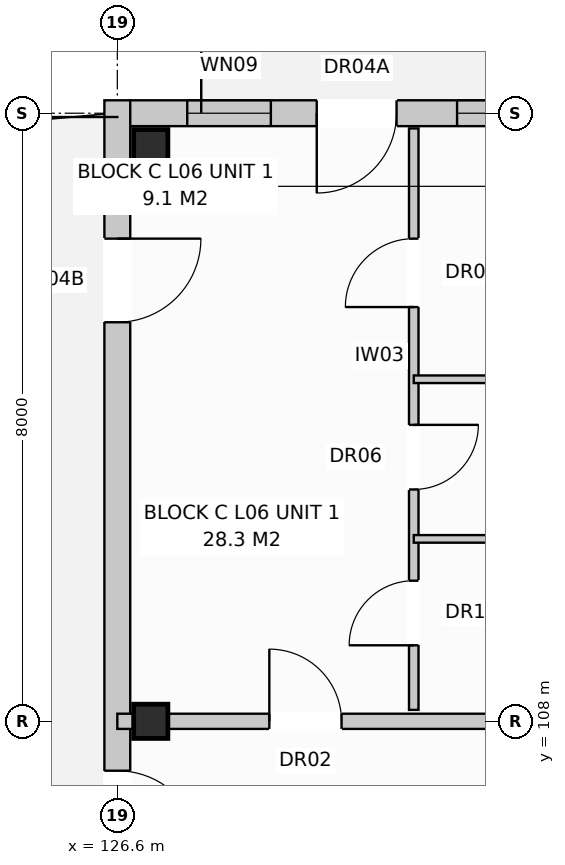
"""IFC4 building model, lengths in metres.
Left out: names, types, materials, properties, quantities, classifications, styles, units other than length and angle.
Written with IfcOpenShell. Run it as: python <this file> out.ifc"""

import sys

from ifc_helpers import new_model, si_unit, direction, frame, frame_2d, origin, origin_with_axes, origin_2d, place, context, subcontext, project, spatial, rectangle, extrude, element, fill, save


model = new_model("IFC4")
c1 = context("Model", 3, precision=1e-05, world=origin(), true_north=direction((0.0, 1.0)))
c2 = subcontext(c1, "Body", "Model", "MODEL_VIEW")
j1 = project(units=[si_unit("LENGTHUNIT", "METRE"), si_unit("PLANEANGLEUNIT", "RADIAN")], contexts=[c1])
p1 = place(None, origin())
s1 = spatial("IfcSite", under=j1, at=p1, CompositionType="ELEMENT")
p2 = place(p1, origin())
s2 = spatial("IfcBuilding", under=s1, at=p2, CompositionType="ELEMENT")
p3 = place(p2, frame((0.0, 0.0, 20.8)))
s3 = spatial("IfcBuildingStorey", under=s2, at=p3, CompositionType="ELEMENT", Elevation=20.8)
for number, where, z_axis, x_axis in (
    (1, (127.04, 108.0, 0.0), (0.0, 0.0, 1.0), (1.0, 0.0, 0.0)),
    (2, (127.04, 115.56, 0.0), (0.0, 0.0, 1.0), (1.0, 0.0, 0.0)),
):
    element("IfcColumn", number, at=place(p3, frame(where, z_axis=z_axis, x_axis=x_axis)), inside=s3, PredefinedType="COLUMN", context=c2, shape_type="SweptSolid", body=[
        extrude(rectangle(XDim=0.45, YDim=0.45, at=origin_2d()), origin(), (0.0, 0.0, 1.0), 3.2),
    ])
p4 = place(p3, frame((126.76, 116.0, 0.0), z_axis=(0.0, 0.0, 1.0), x_axis=(1.0, 0.0, 0.0)))
e3 = element("IfcWall", 3, at=p4, inside=s3, PredefinedType="STANDARD", context=c2, shape_type="SweptSolid", body=[
    extrude(rectangle(XDim=41.08, YDim=0.34, at=frame_2d((20.54, 0.0))), origin(), (0.0, 0.0, 1.0), 2.95),
])
p5 = place(p4, frame((2.464, 0.0, 0.0)))
e4 = element("IfcOpeningElement", 4, at=p5, cuts=e3, PredefinedType="OPENING", context=c2, shape_type="SweptSolid", body=[
    extrude(rectangle(XDim=1.05, YDim=2.12, at=frame_2d((0.525, 1.06))), frame((0.0, 0.182, 0.0), z_axis=(0.0, -1.0, 0.0), x_axis=(1.0, 0.0, 0.0)), (0.0, 0.0, 1.0), 0.364),
])
p6 = place(p4, frame((18.86, 0.0, 0.0)))
e5 = element("IfcOpeningElement", 5, at=p6, cuts=e3, PredefinedType="OPENING", context=c2, shape_type="SweptSolid", body=[
    extrude(rectangle(XDim=1.05, YDim=2.12, at=frame_2d((0.525, 1.06))), frame((0.0, 0.182, 0.0), z_axis=(0.0, -1.0, 0.0), x_axis=(1.0, 0.0, 0.0)), (0.0, 0.0, 1.0), 0.364),
])
p7 = place(p4, frame((28.764, 0.0, 0.0)))
e6 = element("IfcOpeningElement", 6, at=p7, cuts=e3, PredefinedType="OPENING", context=c2, shape_type="SweptSolid", body=[
    extrude(rectangle(XDim=1.05, YDim=2.12, at=frame_2d((0.525, 1.06))), frame((0.0, 0.182, 0.0), z_axis=(0.0, -1.0, 0.0), x_axis=(1.0, 0.0, 0.0)), (0.0, 0.0, 1.0), 0.364),
])
p8 = place(p4, frame((0.76, 0.0, 0.72)))
e7 = element("IfcOpeningElement", 7, at=p8, cuts=e3, PredefinedType="OPENING", context=c2, shape_type="SweptSolid", body=[
    extrude(rectangle(XDim=1.1, YDim=1.5, at=frame_2d((0.55, 0.75))), frame((0.0, 0.182, 0.0), z_axis=(0.0, -1.0, 0.0), x_axis=(1.0, 0.0, 0.0)), (0.0, 0.0, 1.0), 0.364),
])
p9 = place(p4, frame((4.31, 0.0, 0.8)))
e8 = element("IfcOpeningElement", 8, at=p9, cuts=e3, PredefinedType="OPENING", context=c2, shape_type="SweptSolid", body=[
    extrude(rectangle(XDim=1.8, YDim=1.7, at=frame_2d((0.9, 0.85))), frame((0.0, 0.182, 0.0), z_axis=(0.0, -1.0, 0.0), x_axis=(1.0, 0.0, 0.0)), (0.0, 0.0, 1.0), 0.364),
])
p10 = place(p4, frame((7.96, 0.0, 0.72)))
e9 = element("IfcOpeningElement", 9, at=p10, cuts=e3, PredefinedType="OPENING", context=c2, shape_type="SweptSolid", body=[
    extrude(rectangle(XDim=1.9, YDim=1.85, at=frame_2d((0.95, 0.925))), frame((0.0, 0.182, 0.0), z_axis=(0.0, -1.0, 0.0), x_axis=(1.0, 0.0, 0.0)), (0.0, 0.0, 1.0), 0.364),
])
p11 = place(p4, frame((11.66, 0.0, 0.72)))
e10 = element("IfcOpeningElement", 10, at=p11, cuts=e3, PredefinedType="OPENING", context=c2, shape_type="SweptSolid", body=[
    extrude(rectangle(XDim=1.1, YDim=1.5, at=frame_2d((0.55, 0.75))), frame((0.0, 0.182, 0.0), z_axis=(0.0, -1.0, 0.0), x_axis=(1.0, 0.0, 0.0)), (0.0, 0.0, 1.0), 0.364),
])
p12 = place(p4, frame((16.81, 0.0, 0.8)))
e11 = element("IfcOpeningElement", 11, at=p12, cuts=e3, PredefinedType="OPENING", context=c2, shape_type="SweptSolid", body=[
    extrude(rectangle(XDim=1.8, YDim=1.7, at=frame_2d((0.9, 0.85))), frame((0.0, 0.182, 0.0), z_axis=(0.0, -1.0, 0.0), x_axis=(1.0, 0.0, 0.0)), (0.0, 0.0, 1.0), 0.364),
])
p13 = place(p4, frame((22.26, 0.0, 0.72)))
e12 = element("IfcOpeningElement", 12, at=p13, cuts=e3, PredefinedType="OPENING", context=c2, shape_type="SweptSolid", body=[
    extrude(rectangle(XDim=1.9, YDim=1.85, at=frame_2d((0.95, 0.925))), frame((0.0, 0.182, 0.0), z_axis=(0.0, -1.0, 0.0), x_axis=(1.0, 0.0, 0.0)), (0.0, 0.0, 1.0), 0.364),
])
p14 = place(p4, frame((31.135, 0.0, 0.8)))
e13 = element("IfcOpeningElement", 13, at=p14, cuts=e3, PredefinedType="OPENING", context=c2, shape_type="SweptSolid", body=[
    extrude(rectangle(XDim=1.95, YDim=1.65, at=frame_2d((0.975, 0.825))), frame((0.0, 0.182, 0.0), z_axis=(0.0, -1.0, 0.0), x_axis=(1.0, 0.0, 0.0)), (0.0, 0.0, 1.0), 0.364),
])
p15 = place(p4, frame((35.61, 0.0, 0.8)))
e14 = element("IfcOpeningElement", 14, at=p15, cuts=e3, PredefinedType="OPENING", context=c2, shape_type="SweptSolid", body=[
    extrude(rectangle(XDim=1.8, YDim=1.7, at=frame_2d((0.9, 0.85))), frame((0.0, 0.182, 0.0), z_axis=(0.0, -1.0, 0.0), x_axis=(1.0, 0.0, 0.0)), (0.0, 0.0, 1.0), 0.364),
])
p16 = place(p4, frame((39.26, 0.0, 0.72)))
e15 = element("IfcOpeningElement", 15, at=p16, cuts=e3, PredefinedType="OPENING", context=c2, shape_type="SweptSolid", body=[
    extrude(rectangle(XDim=1.1, YDim=1.5, at=frame_2d((0.55, 0.75))), frame((0.0, 0.182, 0.0), z_axis=(0.0, -1.0, 0.0), x_axis=(1.0, 0.0, 0.0)), (0.0, 0.0, 1.0), 0.364),
])
p17 = place(p3, frame((126.6, 97.43, 0.0), z_axis=(0.0, 0.0, 1.0), x_axis=(0.0, 1.0, 0.0)))
e16 = element("IfcWall", 16, at=p17, inside=s3, PredefinedType="STANDARD", context=c2, shape_type="SweptSolid", body=[
    extrude(rectangle(XDim=18.74, YDim=0.34, at=frame_2d((9.37, 0.0))), origin(), (0.0, 0.0, 1.0), 2.95),
])
p18 = place(p17, frame((8.82, 0.0, 0.0)))
e17 = element("IfcOpeningElement", 17, at=p18, cuts=e16, PredefinedType="OPENING", context=c2, shape_type="SweptSolid", body=[
    extrude(rectangle(XDim=1.1, YDim=2.1, at=frame_2d((0.55, 1.05))), frame((0.0, 0.182, 0.0), z_axis=(0.0, -1.0, 0.0), x_axis=(1.0, 0.0, 0.0)), (0.0, 0.0, 1.0), 0.364),
])
p19 = place(p17, frame((15.82, 0.0, 0.0)))
e18 = element("IfcOpeningElement", 18, at=p19, cuts=e16, PredefinedType="OPENING", context=c2, shape_type="SweptSolid", body=[
    extrude(rectangle(XDim=1.1, YDim=2.1, at=frame_2d((0.55, 1.05))), frame((0.0, 0.182, 0.0), z_axis=(0.0, -1.0, 0.0), x_axis=(1.0, 0.0, 0.0)), (0.0, 0.0, 1.0), 0.364),
])
p20 = place(p3, frame((126.6, 108.0, 0.0), z_axis=(0.0, 0.0, 1.0), x_axis=(1.0, 0.0, 0.0)))
e19 = element("IfcWall", 19, at=p20, inside=s3, PredefinedType="PARTITIONING", context=c2, shape_type="SweptSolid", body=[
    extrude(rectangle(XDim=6.9, YDim=0.2, at=frame_2d((3.45, 0.0))), origin(), (0.0, 0.0, 1.0), 2.39),
])
p21 = place(p20, frame((2.0, 0.0, 0.0)))
e20 = element("IfcOpeningElement", 20, at=p21, cuts=e19, PredefinedType="OPENING", context=c2, shape_type="SweptSolid", body=[
    extrude(rectangle(XDim=0.95, YDim=2.15, at=frame_2d((0.475, 1.075))), frame((0.0, 0.112, 0.0), z_axis=(0.0, -1.0, 0.0), x_axis=(1.0, 0.0, 0.0)), (0.0, 0.0, 1.0), 0.224),
])
p22 = place(p3, frame((130.5, 108.15, 0.0), z_axis=(0.0, 0.0, 1.0), x_axis=(0.0, 1.0, 0.0)))
e21 = element("IfcWall", 21, at=p22, inside=s3, PredefinedType="PARTITIONING", context=c2, shape_type="SweptSolid", body=[
    extrude(rectangle(XDim=7.65, YDim=0.125, at=frame_2d((3.825, 0.0))), origin(), (0.0, 0.0, 1.0), 2.95),
])
p23 = place(p22, frame((0.85, 0.0, 0.0)))
e22 = element("IfcOpeningElement", 22, at=p23, cuts=e21, PredefinedType="OPENING", context=c2, shape_type="SweptSolid", body=[
    extrude(rectangle(XDim=0.85, YDim=2.1, at=frame_2d((0.425, 1.05))), frame((0.0, 0.074, 0.0), z_axis=(0.0, -1.0, 0.0), x_axis=(1.0, 0.0, 0.0)), (0.0, 0.0, 1.0), 0.149),
])
p24 = place(p22, frame((2.9, 0.0, 0.0)))
e23 = element("IfcOpeningElement", 23, at=p24, cuts=e21, PredefinedType="OPENING", context=c2, shape_type="SweptSolid", body=[
    extrude(rectangle(XDim=0.85, YDim=2.05, at=frame_2d((0.425, 1.025))), frame((0.0, 0.074, 0.0), z_axis=(0.0, -1.0, 0.0), x_axis=(1.0, 0.0, 0.0)), (0.0, 0.0, 1.0), 0.149),
])
p25 = place(p22, frame((5.3, 0.0, 0.0)))
e24 = element("IfcOpeningElement", 24, at=p25, cuts=e21, PredefinedType="OPENING", context=c2, shape_type="SweptSolid", body=[
    extrude(rectangle(XDim=0.9, YDim=2.1, at=frame_2d((0.45, 1.05))), frame((0.0, 0.074, 0.0), z_axis=(0.0, -1.0, 0.0), x_axis=(1.0, 0.0, 0.0)), (0.0, 0.0, 1.0), 0.149),
])
for number, where, z_axis, x_axis in (
    (25, (130.5, 110.4, 0.0), (0.0, 0.0, 1.0), (1.0, 0.0, 0.0)),
    (26, (130.5, 112.5, 0.0), (0.0, 0.0, 1.0), (1.0, 0.0, 0.0)),
):
    element("IfcWall", number, at=place(p3, frame(where, z_axis=z_axis, x_axis=x_axis)), inside=s3, PredefinedType="PARTITIONING", context=c2, shape_type="SweptSolid", body=[
        extrude(rectangle(XDim=2.9, YDim=0.1, at=frame_2d((1.45, 0.0))), origin(), (0.0, 0.0, 1.0), 2.95),
    ])
p26 = place(p5, frame((1.05, 0.0, 0.0), z_axis=(0.0, 0.0, 1.0), x_axis=(-1.0, 0.0, 0.0)))
e27 = element("IfcDoor", 27, at=p26, inside=s3, OperationType="SINGLE_SWING_LEFT", PredefinedType="DOOR", context=c2, shape_type="SweptSolid", body=[
    extrude(rectangle(XDim=1.05, YDim=2.12, at=frame_2d((0.525, 1.06))), frame((0.0, 0.025, 0.0), z_axis=(0.0, -1.0, 0.0), x_axis=(1.0, 0.0, 0.0)), (0.0, 0.0, 1.0), 0.05),
])
fill(e4, e27)
p27 = place(p8, origin_with_axes())
e28 = element("IfcWindow", 28, at=p27, inside=s3, PartitioningType="SINGLE_PANEL", PredefinedType="WINDOW", context=c2, shape_type="SweptSolid", body=[
    extrude(rectangle(XDim=1.1, YDim=1.5, at=frame_2d((0.55, 0.75))), frame((0.0, 0.03, 0.0), z_axis=(0.0, -1.0, 0.0), x_axis=(1.0, 0.0, 0.0)), (0.0, 0.0, 1.0), 0.06),
])
fill(e7, e28)
p28 = place(p9, origin_with_axes())
e29 = element("IfcWindow", 29, at=p28, inside=s3, PartitioningType="SINGLE_PANEL", PredefinedType="WINDOW", context=c2, shape_type="SweptSolid", body=[
    extrude(rectangle(XDim=1.8, YDim=1.7, at=frame_2d((0.9, 0.85))), frame((0.0, 0.03, 0.0), z_axis=(0.0, -1.0, 0.0), x_axis=(1.0, 0.0, 0.0)), (0.0, 0.0, 1.0), 0.06),
])
fill(e8, e29)
p29 = place(p18, frame((1.1, 0.0, 0.0), z_axis=(0.0, 0.0, 1.0), x_axis=(-1.0, 0.0, 0.0)))
e30 = element("IfcDoor", 30, at=p29, inside=s3, OperationType="SINGLE_SWING_LEFT", PredefinedType="DOOR", context=c2, shape_type="SweptSolid", body=[
    extrude(rectangle(XDim=1.1, YDim=2.1, at=frame_2d((0.55, 1.05))), frame((0.0, 0.025, 0.0), z_axis=(0.0, -1.0, 0.0), x_axis=(1.0, 0.0, 0.0)), (0.0, 0.0, 1.0), 0.05),
])
fill(e17, e30)
p30 = place(p19, frame((1.1, 0.0, 0.0), z_axis=(0.0, 0.0, 1.0), x_axis=(-1.0, 0.0, 0.0)))
e31 = element("IfcDoor", 31, at=p30, inside=s3, OperationType="SINGLE_SWING_RIGHT", PredefinedType="DOOR", context=c2, shape_type="SweptSolid", body=[
    extrude(rectangle(XDim=1.1, YDim=2.1, at=frame_2d((0.55, 1.05))), frame((0.0, 0.025, 0.0), z_axis=(0.0, -1.0, 0.0), x_axis=(1.0, 0.0, 0.0)), (0.0, 0.0, 1.0), 0.05),
])
fill(e18, e31)
p31 = place(p21, origin_with_axes())
e32 = element("IfcDoor", 32, at=p31, inside=s3, OperationType="SINGLE_SWING_LEFT", PredefinedType="DOOR", context=c2, shape_type="SweptSolid", body=[
    extrude(rectangle(XDim=0.95, YDim=2.15, at=frame_2d((0.475, 1.075))), frame((0.0, 0.025, 0.0), z_axis=(0.0, -1.0, 0.0), x_axis=(1.0, 0.0, 0.0)), (0.0, 0.0, 1.0), 0.05),
])
fill(e20, e32)
p32 = place(p23, origin_with_axes())
e33 = element("IfcDoor", 33, at=p32, inside=s3, OperationType="SINGLE_SWING_LEFT", PredefinedType="DOOR", context=c2, shape_type="SweptSolid", body=[
    extrude(rectangle(XDim=0.85, YDim=2.1, at=frame_2d((0.425, 1.05))), frame((0.0, 0.025, 0.0), z_axis=(0.0, -1.0, 0.0), x_axis=(1.0, 0.0, 0.0)), (0.0, 0.0, 1.0), 0.05),
])
fill(e22, e33)
p33 = place(p24, frame((0.85, 0.0, 0.0), z_axis=(0.0, 0.0, 1.0), x_axis=(-1.0, 0.0, 0.0)))
e34 = element("IfcDoor", 34, at=p33, inside=s3, OperationType="SINGLE_SWING_RIGHT", PredefinedType="DOOR", context=c2, shape_type="SweptSolid", body=[
    extrude(rectangle(XDim=0.85, YDim=2.05, at=frame_2d((0.425, 1.025))), frame((0.0, 0.025, 0.0), z_axis=(0.0, -1.0, 0.0), x_axis=(1.0, 0.0, 0.0)), (0.0, 0.0, 1.0), 0.05),
])
fill(e23, e34)
p34 = place(p25, origin_with_axes())
e35 = element("IfcDoor", 35, at=p34, inside=s3, OperationType="SINGLE_SWING_LEFT", PredefinedType="DOOR", context=c2, shape_type="SweptSolid", body=[
    extrude(rectangle(XDim=0.9, YDim=2.1, at=frame_2d((0.45, 1.05))), frame((0.0, 0.025, 0.0), z_axis=(0.0, -1.0, 0.0), x_axis=(1.0, 0.0, 0.0)), (0.0, 0.0, 1.0), 0.05),
])
fill(e24, e35)
save(model, sys.argv[1])
